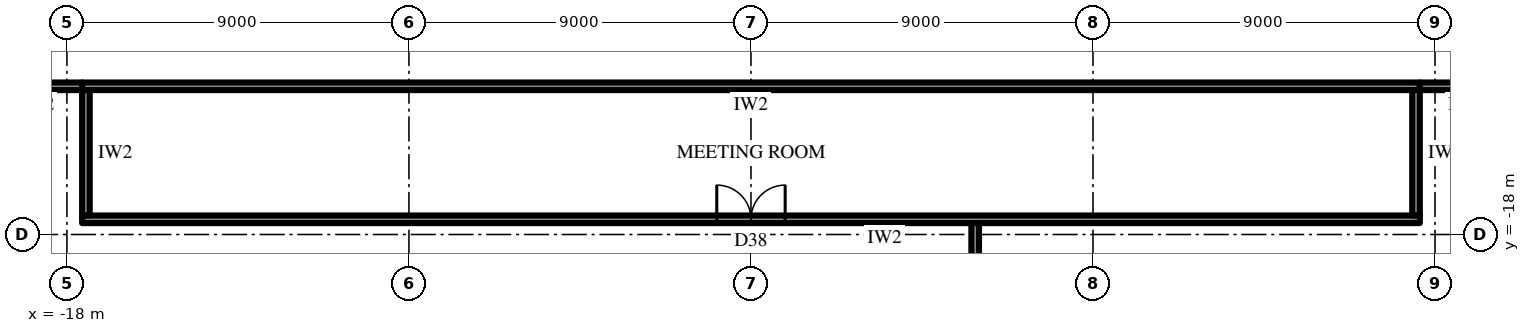
"""IFC4 building model, lengths in metres.
Left out: names, types, materials, properties, quantities, classifications, styles, units other than length and angle.
Written with IfcOpenShell. Run it as: python <this file> out.ifc"""

import sys

from ifc_helpers import new_model, si_unit, direction, frame, frame_2d, origin, place, context, subcontext, project, spatial, rectangle, extrude, element, fill, save


model = new_model("IFC4")
c1 = context("Model", 3, precision=1e-05, world=origin(), true_north=direction((0.0, 1.0)))
c2 = subcontext(c1, "Body", "Model", "MODEL_VIEW")
j1 = project(units=[si_unit("LENGTHUNIT", "METRE"), si_unit("PLANEANGLEUNIT", "RADIAN")], contexts=[c1])
p1 = place(None, origin())
s1 = spatial("IfcSite", under=j1, at=p1, CompositionType="ELEMENT")
p2 = place(p1, origin())
s2 = spatial("IfcBuilding", under=s1, at=p2, CompositionType="ELEMENT")
p3 = place(p2, frame((0.0, 0.0, 52.9)))
s3 = spatial("IfcBuildingStorey", under=s2, at=p3, CompositionType="ELEMENT", Elevation=52.9)
p4 = place(p3, frame((17.6, -14.1, 0.0), z_axis=(0.0, 0.0, 1.0), x_axis=(-1.0, 0.0, 0.0)))
e1 = element("IfcWall", 1, at=p4, inside=s3, PredefinedType="PARTITIONING", context=c2, shape_type="SweptSolid", body=[
    extrude(rectangle(XDim=35.2, YDim=0.2, at=frame_2d((17.6, 0.0))), origin(), (0.0, 0.0, 1.0), 4.0),
])
p5 = place(p3, frame((17.6, -17.6, 0.0), z_axis=(0.0, 0.0, 1.0), x_axis=(-1.0, 0.0, 0.0)))
e2 = element("IfcWall", 2, at=p5, inside=s3, PredefinedType="PARTITIONING", context=c2, shape_type="SweptSolid", body=[
    extrude(rectangle(XDim=35.2, YDim=0.2, at=frame_2d((17.6, 0.0))), origin(), (0.0, 0.0, 1.0), 4.0),
])
p6 = place(p5, frame((16.7, 0.0, 0.0)))
e3 = element("IfcOpeningElement", 3, at=p6, cuts=e2, PredefinedType="OPENING", context=c2, shape_type="SweptSolid", body=[
    extrude(rectangle(XDim=1.8, YDim=2.4, at=frame_2d((0.9, 1.2))), frame((0.0, 0.11, 0.0), z_axis=(0.0, -1.0, 0.0), x_axis=(1.0, 0.0, 0.0)), (0.0, 0.0, 1.0), 0.22),
])
for number, where, z_axis, x_axis in (
    (4, (17.5, -14.2, 0.0), (0.0, 0.0, 1.0), (0.0, -1.0, 0.0)),
    (5, (-17.5, -14.2, 0.0), (0.0, 0.0, 1.0), (0.0, -1.0, 0.0)),
):
    element("IfcWall", number, at=place(p3, frame(where, z_axis=z_axis, x_axis=x_axis)), inside=s3, PredefinedType="PARTITIONING", context=c2, shape_type="SweptSolid", body=[
        extrude(rectangle(XDim=3.3, YDim=0.2, at=frame_2d((1.65, 0.0))), origin(), (0.0, 0.0, 1.0), 4.0),
    ])
p7 = place(p3, frame((17.511, -22.67, 0.0), z_axis=(0.0, 0.0, 1.0), x_axis=(0.500000289772, 0.866025236485, 0.0)))
e6 = element("IfcWall", 6, at=p7, inside=s3, PredefinedType="PARTITIONING", context=c2, shape_type="SweptSolid", body=[
    extrude(rectangle(XDim=21.754, YDim=0.2, at=frame_2d((10.877, 0.0))), origin(), (0.0, 0.0, 1.0), 4.0),
])
p8 = place(p7, frame((4.589, 0.0, 0.0)))
e7 = element("IfcOpeningElement", 7, at=p8, cuts=e6, PredefinedType="OPENING", context=c2, shape_type="SweptSolid", body=[
    extrude(rectangle(XDim=1.8, YDim=2.4, at=frame_2d((0.9, 1.2))), frame((0.0, 0.11, 0.0), z_axis=(0.0, -1.0, 0.0), x_axis=(1.0, 0.0, 0.0)), (0.0, 0.0, 1.0), 0.22),
])
p9 = place(p7, frame((15.366, 0.0, 0.0)))
e8 = element("IfcOpeningElement", 8, at=p9, cuts=e6, PredefinedType="OPENING", context=c2, shape_type="SweptSolid", body=[
    extrude(rectangle(XDim=1.8, YDim=2.4, at=frame_2d((0.9, 1.2))), frame((0.0, 0.11, 0.0), z_axis=(0.0, -1.0, 0.0), x_axis=(1.0, 0.0, 0.0)), (0.0, 0.0, 1.0), 0.22),
])
for number, where, z_axis, x_axis in (
    (9, (-17.6, -14.1, 0.0), (0.0, 0.0, 1.0), (-1.0, 0.0, 0.0)),
    (10, (20.0, -14.1, 0.0), (0.0, 0.0, 1.0), (-1.0, 0.0, 0.0)),
):
    element("IfcWall", number, at=place(p3, frame(where, z_axis=z_axis, x_axis=x_axis)), inside=s3, PredefinedType="PARTITIONING", context=c2, shape_type="SweptSolid", body=[
        extrude(rectangle(XDim=2.4, YDim=0.2, at=frame_2d((1.2, 0.0))), origin(), (0.0, 0.0, 1.0), 4.0),
    ])
p10 = place(p3, frame((5.9, -17.7, 0.0), z_axis=(0.0, 0.0, 1.0), x_axis=(0.0, -1.0, 0.0)))
e11 = element("IfcWall", 11, at=p10, inside=s3, PredefinedType="PARTITIONING", context=c2, shape_type="SweptSolid", body=[
    extrude(rectangle(XDim=14.55, YDim=0.2, at=frame_2d((7.275, 0.0))), origin(), (0.0, 0.0, 1.0), 4.0),
])
p11 = place(p10, frame((0.955, 0.0, 0.0)))
e12 = element("IfcOpeningElement", 12, at=p11, cuts=e11, PredefinedType="OPENING", context=c2, shape_type="SweptSolid", body=[
    extrude(rectangle(XDim=1.0, YDim=2.2, at=frame_2d((0.5, 1.1))), frame((0.0, 0.11, 0.0), z_axis=(0.0, -1.0, 0.0), x_axis=(1.0, 0.0, 0.0)), (0.0, 0.0, 1.0), 0.22),
])
p12 = place(p6, frame((1.8, 0.0, 0.0), z_axis=(0.0, 0.0, 1.0), x_axis=(-1.0, 0.0, 0.0)))
e13 = element("IfcDoor", 13, at=p12, inside=s3, OperationType="DOUBLE_DOOR_SINGLE_SWING", PredefinedType="DOOR", context=c2, shape_type="SweptSolid", body=[
    extrude(rectangle(XDim=1.8, YDim=2.4, at=frame_2d((0.9, 1.2))), frame((0.0, 0.025, 0.0), z_axis=(0.0, -1.0, 0.0), x_axis=(1.0, 0.0, 0.0)), (0.0, 0.0, 1.0), 0.05),
])
fill(e3, e13)
save(model, sys.argv[1])
